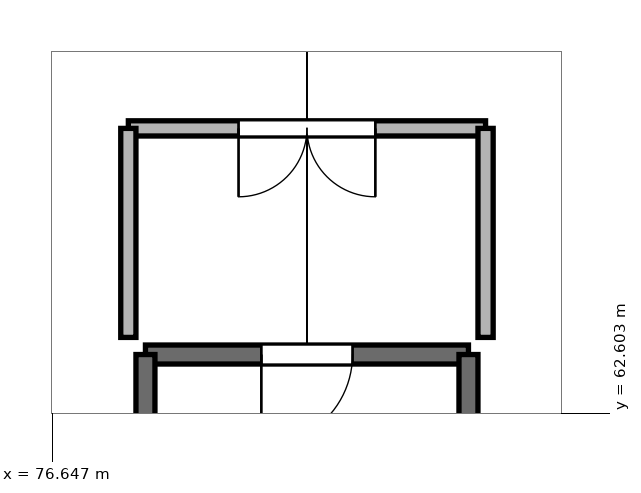
"""IFC4 building model, lengths in metres.
Left out: names, types, materials, properties, quantities, classifications, styles, units other than length and angle.
Written with IfcOpenShell. Run it as: python <this file> out.ifc"""

import sys

from ifc_helpers import new_model, si_unit, direction, frame, frame_2d, origin, place, context, subcontext, project, spatial, rectangle, extrude, element, fill, save


model = new_model("IFC4")
c1 = context("Model", 3, precision=1e-05, world=origin(), true_north=direction((0.0, 1.0)))
c2 = subcontext(c1, "Body", "Model", "MODEL_VIEW")
j1 = project(units=[si_unit("LENGTHUNIT", "METRE"), si_unit("PLANEANGLEUNIT", "RADIAN")], contexts=[c1])
p1 = place(None, origin())
s1 = spatial("IfcSite", under=j1, at=p1, CompositionType="ELEMENT")
p2 = place(p1, origin())
s2 = spatial("IfcBuilding", under=s1, at=p2, CompositionType="ELEMENT")
p3 = place(p2, frame((0.0, 0.0, 37.3)))
s3 = spatial("IfcBuildingStorey", under=s2, at=p3, CompositionType="ELEMENT", Elevation=37.3)
p4 = place(p3, frame((82.125, 63.375, 0.0), z_axis=(0.0, 0.0, 1.0), x_axis=(-1.0, 0.0, 0.0)))
e1 = element("IfcWall", 1, at=p4, inside=s3, PredefinedType="SHEAR", context=c2, shape_type="SweptSolid", body=[
    extrude(rectangle(XDim=4.25, YDim=0.25, at=frame_2d((2.125, 0.0))), origin(), (0.0, 0.0, 1.0), 3.01),
])
p5 = place(p4, frame((1.525, 0.0, 0.0)))
e2 = element("IfcOpeningElement", 2, at=p5, cuts=e1, PredefinedType="OPENING", context=c2, shape_type="SweptSolid", body=[
    extrude(rectangle(XDim=1.2, YDim=2.2, at=frame_2d((0.6, 1.1))), frame((0.0, 0.137, 0.0), z_axis=(0.0, -1.0, 0.0), x_axis=(1.0, 0.0, 0.0)), (0.0, 0.0, 1.0), 0.274),
])
for number, where, z_axis, x_axis in (
    (3, (77.875, 63.375, 0.0), (0.0, 0.0, 1.0), (0.0, -1.0, 0.0)),
    (4, (82.125, 56.175, 0.0), (0.0, 0.0, 1.0), (0.0, 1.0, 0.0)),
):
    element("IfcWall", number, at=place(p3, frame(where, z_axis=z_axis, x_axis=x_axis)), inside=s3, PredefinedType="SHEAR", context=c2, shape_type="SweptSolid", body=[
        extrude(rectangle(XDim=7.2, YDim=0.25, at=frame_2d((3.6, 0.0))), origin(), (0.0, 0.0, 1.0), 3.01),
    ])
p6 = place(p3, frame((77.65, 66.35, 0.0), z_axis=(0.0, 0.0, 1.0), x_axis=(1.0, 0.0, 0.0)))
e5 = element("IfcWall", 5, at=p6, inside=s3, PredefinedType="PARTITIONING", context=c2, shape_type="SweptSolid", body=[
    extrude(rectangle(XDim=4.7, YDim=0.2, at=frame_2d((2.35, 0.0))), origin(), (0.0, 0.0, 1.0), 2.53),
])
p7 = place(p6, frame((1.45, 0.0, 0.0)))
e6 = element("IfcOpeningElement", 6, at=p7, cuts=e5, PredefinedType="OPENING", context=c2, shape_type="SweptSolid", body=[
    extrude(rectangle(XDim=1.8, YDim=2.2, at=frame_2d((0.9, 1.1))), frame((0.0, 0.112, 0.0), z_axis=(0.0, -1.0, 0.0), x_axis=(1.0, 0.0, 0.0)), (0.0, 0.0, 1.0), 0.224),
])
for number, where, z_axis, x_axis in (
    (7, (77.65, 63.6, 0.0), (0.0, 0.0, 1.0), (0.0, 1.0, 0.0)),
    (8, (82.35, 63.6, 0.0), (0.0, 0.0, 1.0), (0.0, 1.0, 0.0)),
):
    element("IfcWall", number, at=place(p3, frame(where, z_axis=z_axis, x_axis=x_axis)), inside=s3, PredefinedType="PARTITIONING", context=c2, shape_type="SweptSolid", body=[
        extrude(rectangle(XDim=2.75, YDim=0.2, at=frame_2d((1.375, 0.0))), origin(), (0.0, 0.0, 1.0), 2.53),
    ])
p8 = place(p5, origin())
e9 = element("IfcDoor", 9, at=p8, inside=s3, OperationType="SINGLE_SWING_RIGHT", PredefinedType="DOOR", context=c2, shape_type="SweptSolid", body=[
    extrude(rectangle(XDim=1.2, YDim=2.2, at=frame_2d((0.6, 1.1))), frame((0.0, 0.025, 0.0), z_axis=(0.0, -1.0, 0.0), x_axis=(1.0, 0.0, 0.0)), (0.0, 0.0, 1.0), 0.05),
])
fill(e2, e9)
p9 = place(p7, frame((1.8, 0.0, 0.0), z_axis=(0.0, 0.0, 1.0), x_axis=(-1.0, 0.0, 0.0)))
e10 = element("IfcDoor", 10, at=p9, inside=s3, OperationType="DOUBLE_DOOR_SINGLE_SWING", PredefinedType="DOOR", context=c2, shape_type="SweptSolid", body=[
    extrude(rectangle(XDim=1.8, YDim=2.2, at=frame_2d((0.9, 1.1))), frame((0.0, 0.025, 0.0), z_axis=(0.0, -1.0, 0.0), x_axis=(1.0, 0.0, 0.0)), (0.0, 0.0, 1.0), 0.05),
])
fill(e6, e10)
save(model, sys.argv[1])
